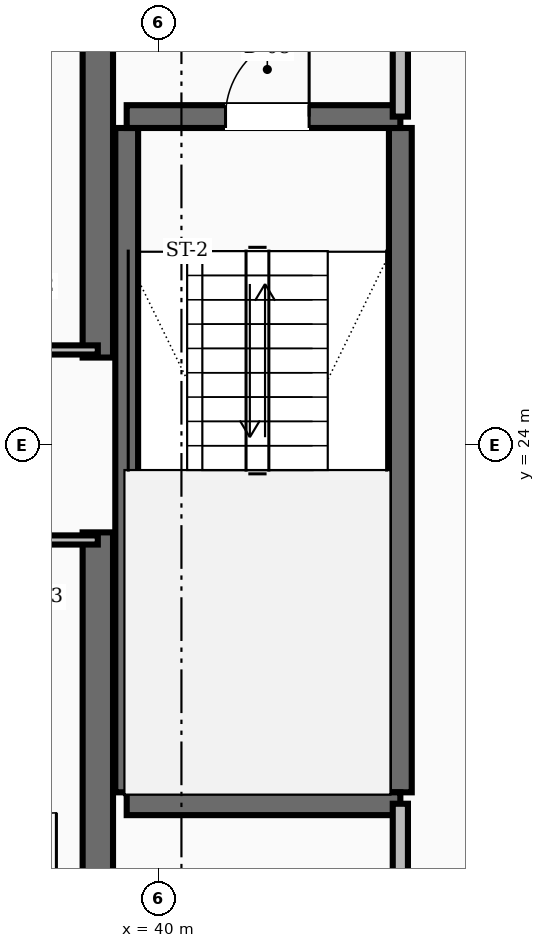
"""IFC4 building model, lengths in metres.
Left out: names, types, materials, properties, quantities, classifications, styles, units other than length and angle.
Written with IfcOpenShell. Run it as: python <this file> out.ifc"""

import sys

from ifc_helpers import new_model, si_unit, direction, frame, frame_2d, origin, place, context, subcontext, project, spatial, rectangle, extrude, element, fill, save


model = new_model("IFC4")
c1 = context("Model", 3, precision=1e-05, world=origin(), true_north=direction((0.0, 1.0)))
c2 = subcontext(c1, "Body", "Model", "MODEL_VIEW")
j1 = project(units=[si_unit("LENGTHUNIT", "METRE"), si_unit("PLANEANGLEUNIT", "RADIAN")], contexts=[c1])
p1 = place(None, origin())
s1 = spatial("IfcSite", under=j1, at=p1, CompositionType="ELEMENT")
p2 = place(p1, origin())
s2 = spatial("IfcBuilding", under=s1, at=p2, CompositionType="ELEMENT")
p3 = place(p2, frame((0.0, 0.0, 44.8)))
s3 = spatial("IfcBuildingStorey", under=s2, at=p3, CompositionType="ELEMENT", Elevation=44.8)
for number, where, z_axis, x_axis in (
    (1, (39.2, 16.55, 0.0), (0.0, 0.0, 1.0), (0.0, 1.0, 0.0)),
    (2, (39.2, 25.15, 0.0), (0.0, 0.0, 1.0), (0.0, 1.0, 0.0)),
):
    element("IfcWall", number, at=place(p3, frame(where, z_axis=z_axis, x_axis=x_axis)), inside=s3, PredefinedType="SHEAR", context=c2, shape_type="SweptSolid", body=[
        extrude(rectangle(XDim=6.3, YDim=0.4, at=frame_2d((3.15, 0.0))), origin(), (0.0, 0.0, 1.0), 3.6),
    ])
for number, where, z_axis, x_axis in (
    (3, (43.18, 19.43, 0.0), (0.0, 0.0, 1.0), (0.0, 1.0, 0.0)),
    (4, (39.58, 19.43, 0.0), (0.0, 0.0, 1.0), (0.0, 1.0, 0.0)),
):
    element("IfcWall", number, at=place(p3, frame(where, z_axis=z_axis, x_axis=x_axis)), inside=s3, PredefinedType="SHEAR", context=c2, shape_type="SweptSolid", body=[
        extrude(rectangle(XDim=8.74, YDim=0.3, at=frame_2d((4.37, 0.0))), origin(), (0.0, 0.0, 1.0), 3.6),
    ])
p4 = place(p3, frame((39.58, 19.28, 0.0), z_axis=(0.0, 0.0, 1.0), x_axis=(1.0, 0.0, 0.0)))
e5 = element("IfcWall", 5, at=p4, inside=s3, PredefinedType="SHEAR", context=c2, shape_type="SweptSolid", body=[
    extrude(rectangle(XDim=3.6, YDim=0.3, at=frame_2d((1.8, 0.0))), origin(), (0.0, 0.0, 1.0), 3.6),
])
p5 = place(p3, frame((39.58, 28.32, 0.0), z_axis=(0.0, 0.0, 1.0), x_axis=(1.0, 0.0, 0.0)))
e6 = element("IfcWall", 6, at=p5, inside=s3, PredefinedType="SHEAR", context=c2, shape_type="SweptSolid", body=[
    extrude(rectangle(XDim=3.6, YDim=0.3, at=frame_2d((1.8, 0.0))), origin(), (0.0, 0.0, 1.0), 3.6),
])
p6 = place(p5, frame((1.3, 0.0, 0.0)))
e7 = element("IfcOpeningElement", 7, at=p6, cuts=e6, PredefinedType="OPENING", context=c2, shape_type="SweptSolid", body=[
    extrude(rectangle(XDim=1.1, YDim=2.1, at=frame_2d((0.55, 1.05))), frame((0.0, 0.16, 0.0), z_axis=(0.0, -1.0, 0.0), x_axis=(1.0, 0.0, 0.0)), (0.0, 0.0, 1.0), 0.32),
])
p7 = place(p3, frame((43.18, 28.32, 0.0), z_axis=(0.0, 0.0, 1.0), x_axis=(0.0, 1.0, 0.0)))
e8 = element("IfcWall", 8, at=p7, inside=s3, PredefinedType="SOLIDWALL", context=c2, shape_type="SweptSolid", body=[
    extrude(rectangle(XDim=3.13, YDim=0.2, at=frame_2d((1.565, 0.0))), origin(), (0.0, 0.0, 1.0), 2.61),
])
p8 = place(p7, frame((1.015, 0.0, 0.0)))
e9 = element("IfcOpeningElement", 9, at=p8, cuts=e8, PredefinedType="OPENING", context=c2, shape_type="SweptSolid", body=[
    extrude(rectangle(XDim=1.1, YDim=2.1, at=frame_2d((0.55, 1.05))), frame((0.0, 0.11, 0.0), z_axis=(0.0, -1.0, 0.0), x_axis=(1.0, 0.0, 0.0)), (0.0, 0.0, 1.0), 0.22),
])
p9 = place(p3, frame((43.18, 16.55, 0.0), z_axis=(0.0, 0.0, 1.0), x_axis=(0.0, 1.0, 0.0)))
e10 = element("IfcWall", 10, at=p9, inside=s3, PredefinedType="SOLIDWALL", context=c2, shape_type="SweptSolid", body=[
    extrude(rectangle(XDim=2.73, YDim=0.2, at=frame_2d((1.365, 0.0))), origin(), (0.0, 0.0, 1.0), 2.61),
])
p10 = place(p9, frame((0.89, 0.0, 0.0)))
e11 = element("IfcOpeningElement", 11, at=p10, cuts=e10, PredefinedType="OPENING", context=c2, shape_type="SweptSolid", body=[
    extrude(rectangle(XDim=0.95, YDim=2.1, at=frame_2d((0.475, 1.05))), frame((0.0, 0.11, 0.0), z_axis=(0.0, -1.0, 0.0), x_axis=(1.0, 0.0, 0.0)), (0.0, 0.0, 1.0), 0.22),
])
for number, where, z_axis, x_axis in (
    (12, (37.4, 25.25, 0.0), (0.0, 0.0, 1.0), (1.0, 0.0, 0.0)),
    (13, (37.4, 22.75, 0.0), (0.0, 0.0, 1.0), (1.0, 0.0, 0.0)),
):
    element("IfcWall", number, at=place(p3, frame(where, z_axis=z_axis, x_axis=x_axis)), inside=s3, PredefinedType="PARTITIONING", context=c2, shape_type="SweptSolid", body=[
        extrude(rectangle(XDim=1.8, YDim=0.12, at=frame_2d((0.9, 0.0))), origin(), (0.0, 0.0, 1.0), 2.61),
    ])
p11 = place(p6, origin())
e14 = element("IfcDoor", 14, at=p11, inside=s3, OperationType="SINGLE_SWING_RIGHT", PredefinedType="DOOR", context=c2, shape_type="SweptSolid", body=[
    extrude(rectangle(XDim=1.1, YDim=2.1, at=frame_2d((0.55, 1.05))), frame((0.0, 0.025, 0.0), z_axis=(0.0, -1.0, 0.0), x_axis=(1.0, 0.0, 0.0)), (0.0, 0.0, 1.0), 0.05),
])
fill(e7, e14)
save(model, sys.argv[1])
